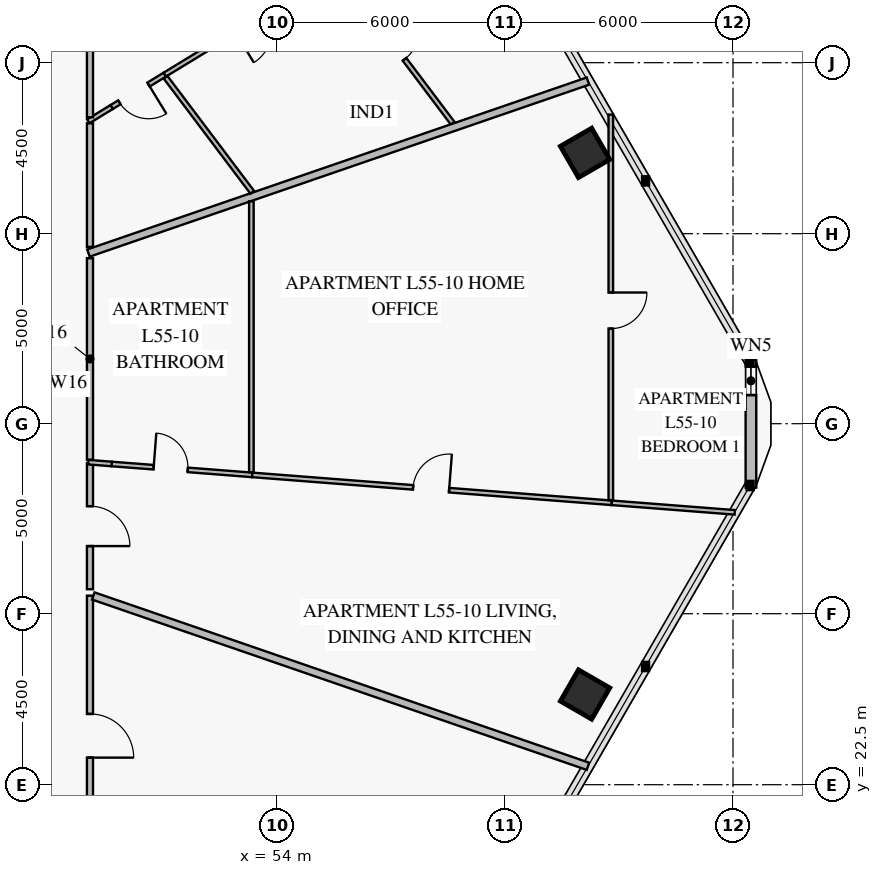
"""IFC4 building model, lengths in metres.
Left out: names, types, materials, properties, quantities, classifications, styles, units other than length and angle.
Written with IfcOpenShell. Run it as: python <this file> out.ifc"""

import sys

from ifc_helpers import new_model, si_unit, direction, frame, frame_2d, origin, origin_2d, place, context, subcontext, project, spatial, rectangle, extrude, element, fill, save


model = new_model("IFC4")
c1 = context("Model", 3, precision=1e-05, world=origin(), true_north=direction((0.0, 1.0)))
c2 = subcontext(c1, "Body", "Model", "MODEL_VIEW")
j1 = project(units=[si_unit("LENGTHUNIT", "METRE"), si_unit("PLANEANGLEUNIT", "RADIAN")], contexts=[c1])
p1 = place(None, origin())
s1 = spatial("IfcSite", under=j1, at=p1, CompositionType="ELEMENT")
p2 = place(p1, origin())
s2 = spatial("IfcBuilding", under=s1, at=p2, CompositionType="ELEMENT")
p3 = place(p2, frame((0.0, 0.0, 218.8)))
s3 = spatial("IfcBuildingStorey", under=s2, at=p3, CompositionType="ELEMENT", Elevation=218.8)
for number, where, z_axis, x_axis in (
    (1, (62.108, 39.126, 0.0), (0.0, 0.0, 1.0), (-0.5, 0.866, 0.0)),
    (2, (62.108, 24.874, 0.0), (0.0, 0.0, 1.0), (0.5, 0.866, 0.0)),
):
    element("IfcColumn", number, at=place(p3, frame(where, z_axis=z_axis, x_axis=x_axis)), inside=s3, PredefinedType="COLUMN", context=c2, shape_type="SweptSolid", body=[
        extrude(rectangle(XDim=0.95, YDim=0.95, at=origin_2d()), origin(), (0.0, 0.0, 1.0), 3.55),
    ])
p4 = place(p3, frame((66.472, 33.683, 0.0), z_axis=(0.0, 0.0, 1.0), x_axis=(0.0, -1.0, 0.0)))
e3 = element("IfcWall", 3, at=p4, inside=s3, PredefinedType="SOLIDWALL", context=c2, shape_type="SweptSolid", body=[
    extrude(rectangle(XDim=3.365, YDim=0.28, at=frame_2d((1.683, 0.0))), origin(), (0.0, 0.0, 1.0), 3.55),
])
p5 = place(p4, frame((0.179, 0.0, 0.85)))
e4 = element("IfcOpeningElement", 4, at=p5, cuts=e3, PredefinedType="OPENING", context=c2, shape_type="SweptSolid", body=[
    extrude(rectangle(XDim=0.75, YDim=1.5, at=frame_2d((0.375, 0.75))), frame((0.0, 0.152, 0.0), z_axis=(0.0, -1.0, 0.0), x_axis=(1.0, 0.0, 0.0)), (0.0, 0.0, 1.0), 0.304),
])
p6 = place(p3, frame((49.65, 40.332, 0.0), z_axis=(0.0, 0.0, 1.0), x_axis=(0.853576385117, 0.520967709911, 0.0)))
e5 = element("IfcWall", 5, at=p6, inside=s3, PredefinedType="PARTITIONING", context=c2, shape_type="SweptSolid", body=[
    extrude(rectangle(XDim=1.638, YDim=0.12, at=frame_2d((0.819, 0.0))), origin(), (0.0, 0.0, 1.0), 3.55),
])
p7 = place(p6, frame((0.238, 0.0, 0.0)))
e6 = element("IfcOpeningElement", 6, at=p7, cuts=e5, PredefinedType="OPENING", context=c2, shape_type="SweptSolid", body=[
    extrude(rectangle(XDim=0.9, YDim=2.1, at=frame_2d((0.45, 1.05))), frame((0.0, 0.072, 0.0), z_axis=(0.0, -1.0, 0.0), x_axis=(1.0, 0.0, 0.0)), (0.0, 0.0, 1.0), 0.144),
])
p8 = place(p3, frame((51.048, 41.186, 0.0), z_axis=(0.0, 0.0, 1.0), x_axis=(0.853552291935, 0.521007183187, 0.0)))
e7 = element("IfcWall", 7, at=p8, inside=s3, PredefinedType="PARTITIONING", context=c2, shape_type="SweptSolid", body=[
    extrude(rectangle(XDim=5.331, YDim=0.12, at=frame_2d((2.666, 0.0))), origin(), (0.0, 0.0, 1.0), 3.15),
])
p9 = place(p8, frame((2.165, 0.0, 0.0)))
e8 = element("IfcOpeningElement", 8, at=p9, cuts=e7, PredefinedType="OPENING", context=c2, shape_type="SweptSolid", body=[
    extrude(rectangle(XDim=0.95, YDim=2.1, at=frame_2d((0.475, 1.05))), frame((0.0, 0.072, 0.0), z_axis=(0.0, -1.0, 0.0), x_axis=(1.0, 0.0, 0.0)), (0.0, 0.0, 1.0), 0.144),
])
p10 = place(p3, frame((58.625, 39.906, 0.0), z_axis=(0.0, 0.0, 1.0), x_axis=(-0.60182042423, 0.798631440015, 0.0)))
e9 = element("IfcWall", 9, at=p10, inside=s3, PredefinedType="PARTITIONING", context=c2, shape_type="SweptSolid", body=[
    extrude(rectangle(XDim=4.995, YDim=0.12, at=frame_2d((2.498, 0.0))), origin(), (0.0, 0.0, 1.0), 3.55),
])
p11 = place(p10, frame((2.107, 0.0, 0.0)))
e10 = element("IfcOpeningElement", 10, at=p11, cuts=e9, PredefinedType="OPENING", context=c2, shape_type="SweptSolid", body=[
    extrude(rectangle(XDim=0.95, YDim=2.1, at=frame_2d((0.475, 1.05))), frame((0.0, 0.072, 0.0), z_axis=(0.0, -1.0, 0.0), x_axis=(1.0, 0.0, 0.0)), (0.0, 0.0, 1.0), 0.144),
])
p12 = place(p3, frame((49.08, 20.1, 0.0), z_axis=(0.0, 0.0, 1.0), x_axis=(0.0, 1.0, 0.0)))
e11 = element("IfcWall", 11, at=p12, inside=s3, PredefinedType="PARTITIONING", context=c2, shape_type="SweptSolid", body=[
    extrude(rectangle(XDim=7.375, YDim=0.16, at=frame_2d((3.688, 0.0))), origin(), (0.0, 0.0, 1.0), 3.55),
])
p13 = place(p12, frame((3.113, 0.0, 0.0)))
e12 = element("IfcOpeningElement", 12, at=p13, cuts=e11, PredefinedType="OPENING", context=c2, shape_type="SweptSolid", body=[
    extrude(rectangle(XDim=1.15, YDim=2.2, at=frame_2d((0.575, 1.1))), frame((0.0, 0.092, 0.0), z_axis=(0.0, -1.0, 0.0), x_axis=(1.0, 0.0, 0.0)), (0.0, 0.0, 1.0), 0.184),
])
p14 = place(p3, frame((49.65, 30.94, 0.0), z_axis=(0.0, 0.0, 1.0), x_axis=(0.996995398774, -0.077460795393, 0.0)))
e13 = element("IfcWall", 13, at=p14, inside=s3, PredefinedType="PARTITIONING", context=c2, shape_type="SweptSolid", body=[
    extrude(rectangle(XDim=3.713, YDim=0.12, at=frame_2d((1.856, 0.0))), origin(), (0.0, 0.0, 1.0), 3.55),
])
p15 = place(p14, frame((1.109, 0.0, 0.0)))
e14 = element("IfcOpeningElement", 14, at=p15, cuts=e13, PredefinedType="OPENING", context=c2, shape_type="SweptSolid", body=[
    extrude(rectangle(XDim=0.9, YDim=2.1, at=frame_2d((0.45, 1.05))), frame((0.0, 0.072, 0.0), z_axis=(0.0, -1.0, 0.0), x_axis=(1.0, 0.0, 0.0)), (0.0, 0.0, 1.0), 0.144),
])
p16 = place(p3, frame((53.352, 30.653, 0.0), z_axis=(0.0, 0.0, 1.0), x_axis=(0.996998969354, -0.077414824849, 0.0)))
e15 = element("IfcWall", 15, at=p16, inside=s3, PredefinedType="PARTITIONING", context=c2, shape_type="SweptSolid", body=[
    extrude(rectangle(XDim=9.486, YDim=0.12, at=frame_2d((4.743, 0.0))), origin(), (0.0, 0.0, 1.0), 2.87),
])
p17 = place(p16, frame((4.243, 0.0, 0.0)))
e16 = element("IfcOpeningElement", 16, at=p17, cuts=e15, PredefinedType="OPENING", context=c2, shape_type="SweptSolid", body=[
    extrude(rectangle(XDim=0.95, YDim=2.1, at=frame_2d((0.475, 1.05))), frame((0.0, 0.072, 0.0), z_axis=(0.0, -1.0, 0.0), x_axis=(1.0, 0.0, 0.0)), (0.0, 0.0, 1.0), 0.144),
])
p18 = place(p3, frame((62.784, 29.988, 0.0), z_axis=(0.0, 0.0, 1.0), x_axis=(0.0, 1.0, 0.0)))
e17 = element("IfcWall", 17, at=p18, inside=s3, PredefinedType="PARTITIONING", context=c2, shape_type="SweptSolid", body=[
    extrude(rectangle(XDim=10.146, YDim=0.12, at=frame_2d((5.073, 0.0))), origin(), (0.0, 0.0, 1.0), 3.122),
])
p19 = place(p18, frame((4.514, 0.0, 0.0)))
e18 = element("IfcOpeningElement", 18, at=p19, cuts=e17, PredefinedType="OPENING", context=c2, shape_type="SweptSolid", body=[
    extrude(rectangle(XDim=0.95, YDim=2.1, at=frame_2d((0.475, 1.05))), frame((0.0, 0.072, 0.0), z_axis=(0.0, -1.0, 0.0), x_axis=(1.0, 0.0, 0.0)), (0.0, 0.0, 1.0), 0.144),
])
p20 = place(p3, frame((49.08, 27.645, 0.0), z_axis=(0.0, 0.0, 1.0), x_axis=(0.0, 1.0, 0.0)))
e19 = element("IfcWall", 19, at=p20, inside=s3, PredefinedType="PARTITIONING", context=c2, shape_type="SweptSolid", body=[
    extrude(rectangle(XDim=3.32, YDim=0.16, at=frame_2d((1.66, 0.0))), origin(), (0.0, 0.0, 1.0), 2.9),
])
p21 = place(p20, frame((1.135, 0.0, 0.0)))
e20 = element("IfcOpeningElement", 20, at=p21, cuts=e19, PredefinedType="OPENING", context=c2, shape_type="SweptSolid", body=[
    extrude(rectangle(XDim=1.05, YDim=2.15, at=frame_2d((0.525, 1.075))), frame((0.0, 0.092, 0.0), z_axis=(0.0, -1.0, 0.0), x_axis=(1.0, 0.0, 0.0)), (0.0, 0.0, 1.0), 0.184),
])
p22 = place(p3, frame((49.04, 36.49, 0.0), z_axis=(0.0, 0.0, 1.0), x_axis=(0.94551604925, 0.325575491417, 0.0)))
e21 = element("IfcWall", 21, at=p22, inside=s3, PredefinedType="PARTITIONING", context=c2, shape_type="SweptSolid", body=[
    extrude(rectangle(XDim=13.9, YDim=0.2, at=frame_2d((6.95, 0.0))), origin(), (0.0, 0.0, 1.0), 2.87),
])
p23 = place(p3, frame((49.035, 39.957, 0.0), z_axis=(0.0, 0.0, 1.0), x_axis=(0.853491148884, 0.521107339017, 0.0)))
e22 = element("IfcWall", 22, at=p23, inside=s3, PredefinedType="PARTITIONING", context=c2, shape_type="SweptSolid", body=[
    extrude(rectangle(XDim=0.72, YDim=0.12, at=frame_2d((0.36, 0.0))), origin(), (0.0, 0.0, 1.0), 3.55),
])
p24 = place(p3, frame((53.351, 38.089, 0.0), z_axis=(0.0, 0.0, 1.0), x_axis=(-0.601810973107, 0.798638561959, 0.0)))
e23 = element("IfcWall", 23, at=p24, inside=s3, PredefinedType="PARTITIONING", context=c2, shape_type="SweptSolid", body=[
    extrude(rectangle(XDim=3.793, YDim=0.12, at=frame_2d((1.896, 0.0))), origin(), (0.0, 0.0, 1.0), 3.55),
])
p25 = place(p3, frame((49.168, 27.466, 0.0), z_axis=(0.0, 0.0, 1.0), x_axis=(0.945519149225, -0.325566488523, 0.0)))
e24 = element("IfcWall", 24, at=p25, inside=s3, PredefinedType="PARTITIONING", context=c2, shape_type="SweptSolid", body=[
    extrude(rectangle(XDim=13.765, YDim=0.2, at=frame_2d((6.883, 0.0))), origin(), (0.0, 0.0, 1.0), 2.87),
])
p26 = place(p3, frame((49.035, 30.988, 0.0), z_axis=(0.0, 0.0, 1.0), x_axis=(0.997017116246, -0.077180761281, 0.0)))
e25 = element("IfcWall", 25, at=p26, inside=s3, PredefinedType="PARTITIONING", context=c2, shape_type="SweptSolid", body=[
    extrude(rectangle(XDim=0.617, YDim=0.12, at=frame_2d((0.309, 0.0))), origin(), (0.0, 0.0, 1.0), 3.55),
])
p27 = place(p3, frame((62.809, 29.918, 0.0), z_axis=(0.0, 0.0, 1.0), x_axis=(0.997003410979, -0.07735760141, 0.0)))
e26 = element("IfcWall", 26, at=p27, inside=s3, PredefinedType="PARTITIONING", context=c2, shape_type="SweptSolid", body=[
    extrude(rectangle(XDim=3.248, YDim=0.12, at=frame_2d((1.624, 0.0))), origin(), (0.0, 0.0, 1.0), 3.55),
])
p28 = place(p3, frame((53.327, 30.723, 0.0), z_axis=(0.0, 0.0, 1.0), x_axis=(0.0, 1.0, 0.0)))
e27 = element("IfcWall", 27, at=p28, inside=s3, PredefinedType="PARTITIONING", context=c2, shape_type="SweptSolid", body=[
    extrude(rectangle(XDim=7.129, YDim=0.12, at=frame_2d((3.564, 0.0))), origin(), (0.0, 0.0, 1.0), 2.9),
])
p29 = place(p3, frame((49.08, 40.064, 0.0), z_axis=(0.0, 0.0, 1.0), x_axis=(0.0, 1.0, 0.0)))
e28 = element("IfcWall", 28, at=p29, inside=s3, PredefinedType="PARTITIONING", context=c2, shape_type="SweptSolid", body=[
    extrude(rectangle(XDim=3.836, YDim=0.16, at=frame_2d((1.918, 0.0))), origin(), (0.0, 0.0, 1.0), 3.55),
])
p30 = place(p3, frame((49.08, 36.653, 0.0), z_axis=(0.0, 0.0, 1.0), x_axis=(0.0, 1.0, 0.0)))
e29 = element("IfcWall", 29, at=p30, inside=s3, PredefinedType="PARTITIONING", context=c2, shape_type="SweptSolid", body=[
    extrude(rectangle(XDim=3.251, YDim=0.16, at=frame_2d((1.625, 0.0))), origin(), (0.0, 0.0, 1.0), 3.55),
])
p31 = place(p3, frame((49.08, 31.052, 0.0), z_axis=(0.0, 0.0, 1.0), x_axis=(0.0, 1.0, 0.0)))
e30 = element("IfcWall", 30, at=p31, inside=s3, PredefinedType="PARTITIONING", context=c2, shape_type="SweptSolid", body=[
    extrude(rectangle(XDim=5.303, YDim=0.16, at=frame_2d((2.651, 0.0))), origin(), (0.0, 0.0, 1.0), 2.9),
])
p32 = place(p5, origin())
e31 = element("IfcWindow", 31, at=p32, inside=s3, PartitioningType="SINGLE_PANEL", PredefinedType="WINDOW", context=c2, shape_type="SweptSolid", body=[
    extrude(rectangle(XDim=0.75, YDim=1.5, at=frame_2d((0.375, 0.75))), frame((0.0, 0.03, 0.0), z_axis=(0.0, -1.0, 0.0), x_axis=(1.0, 0.0, 0.0)), (0.0, 0.0, 1.0), 0.06),
])
fill(e4, e31)
p33 = place(p7, frame((0.9, 0.0, 0.0), z_axis=(0.0, 0.0, 1.0), x_axis=(-1.0, 0.0, 0.0)))
e32 = element("IfcDoor", 32, at=p33, inside=s3, OperationType="SINGLE_SWING_LEFT", PredefinedType="DOOR", context=c2, shape_type="SweptSolid", body=[
    extrude(rectangle(XDim=0.9, YDim=2.1, at=frame_2d((0.45, 1.05))), frame((0.0, 0.025, 0.0), z_axis=(0.0, -1.0, 0.0), x_axis=(1.0, 0.0, 0.0)), (0.0, 0.0, 1.0), 0.05),
])
fill(e6, e32)
p34 = place(p11, frame((0.95, 0.0, 0.0), z_axis=(0.0, 0.0, 1.0), x_axis=(-1.0, 0.0, 0.0)))
e33 = element("IfcDoor", 33, at=p34, inside=s3, OperationType="SINGLE_SWING_LEFT", PredefinedType="DOOR", context=c2, shape_type="SweptSolid", body=[
    extrude(rectangle(XDim=0.95, YDim=2.1, at=frame_2d((0.475, 1.05))), frame((0.0, 0.025, 0.0), z_axis=(0.0, -1.0, 0.0), x_axis=(1.0, 0.0, 0.0)), (0.0, 0.0, 1.0), 0.05),
])
fill(e10, e33)
p35 = place(p13, frame((1.15, 0.0, 0.0), z_axis=(0.0, 0.0, 1.0), x_axis=(-1.0, 0.0, 0.0)))
e34 = element("IfcDoor", 34, at=p35, inside=s3, OperationType="SINGLE_SWING_RIGHT", PredefinedType="DOOR", context=c2, shape_type="SweptSolid", body=[
    extrude(rectangle(XDim=1.15, YDim=2.2, at=frame_2d((0.575, 1.1))), frame((0.0, 0.025, 0.0), z_axis=(0.0, -1.0, 0.0), x_axis=(1.0, 0.0, 0.0)), (0.0, 0.0, 1.0), 0.05),
])
fill(e12, e34)
p36 = place(p15, origin())
e35 = element("IfcDoor", 35, at=p36, inside=s3, OperationType="SINGLE_SWING_LEFT", PredefinedType="DOOR", context=c2, shape_type="SweptSolid", body=[
    extrude(rectangle(XDim=0.9, YDim=2.1, at=frame_2d((0.45, 1.05))), frame((0.0, 0.025, 0.0), z_axis=(0.0, -1.0, 0.0), x_axis=(1.0, 0.0, 0.0)), (0.0, 0.0, 1.0), 0.05),
])
fill(e14, e35)
p37 = place(p17, origin())
e36 = element("IfcDoor", 36, at=p37, inside=s3, OperationType="SINGLE_SWING_RIGHT", PredefinedType="DOOR", context=c2, shape_type="SweptSolid", body=[
    extrude(rectangle(XDim=0.95, YDim=2.1, at=frame_2d((0.475, 1.05))), frame((0.0, 0.025, 0.0), z_axis=(0.0, -1.0, 0.0), x_axis=(1.0, 0.0, 0.0)), (0.0, 0.0, 1.0), 0.05),
])
fill(e16, e36)
p38 = place(p19, frame((0.95, 0.0, 0.0), z_axis=(0.0, 0.0, 1.0), x_axis=(-1.0, 0.0, 0.0)))
e37 = element("IfcDoor", 37, at=p38, inside=s3, OperationType="SINGLE_SWING_LEFT", PredefinedType="DOOR", context=c2, shape_type="SweptSolid", body=[
    extrude(rectangle(XDim=0.95, YDim=2.1, at=frame_2d((0.475, 1.05))), frame((0.0, 0.025, 0.0), z_axis=(0.0, -1.0, 0.0), x_axis=(1.0, 0.0, 0.0)), (0.0, 0.0, 1.0), 0.05),
])
fill(e18, e37)
p39 = place(p21, frame((1.05, 0.0, 0.0), z_axis=(0.0, 0.0, 1.0), x_axis=(-1.0, 0.0, 0.0)))
e38 = element("IfcDoor", 38, at=p39, inside=s3, OperationType="SINGLE_SWING_RIGHT", PredefinedType="DOOR", context=c2, shape_type="SweptSolid", body=[
    extrude(rectangle(XDim=1.05, YDim=2.15, at=frame_2d((0.525, 1.075))), frame((0.0, 0.025, 0.0), z_axis=(0.0, -1.0, 0.0), x_axis=(1.0, 0.0, 0.0)), (0.0, 0.0, 1.0), 0.05),
])
fill(e20, e38)
save(model, sys.argv[1])
